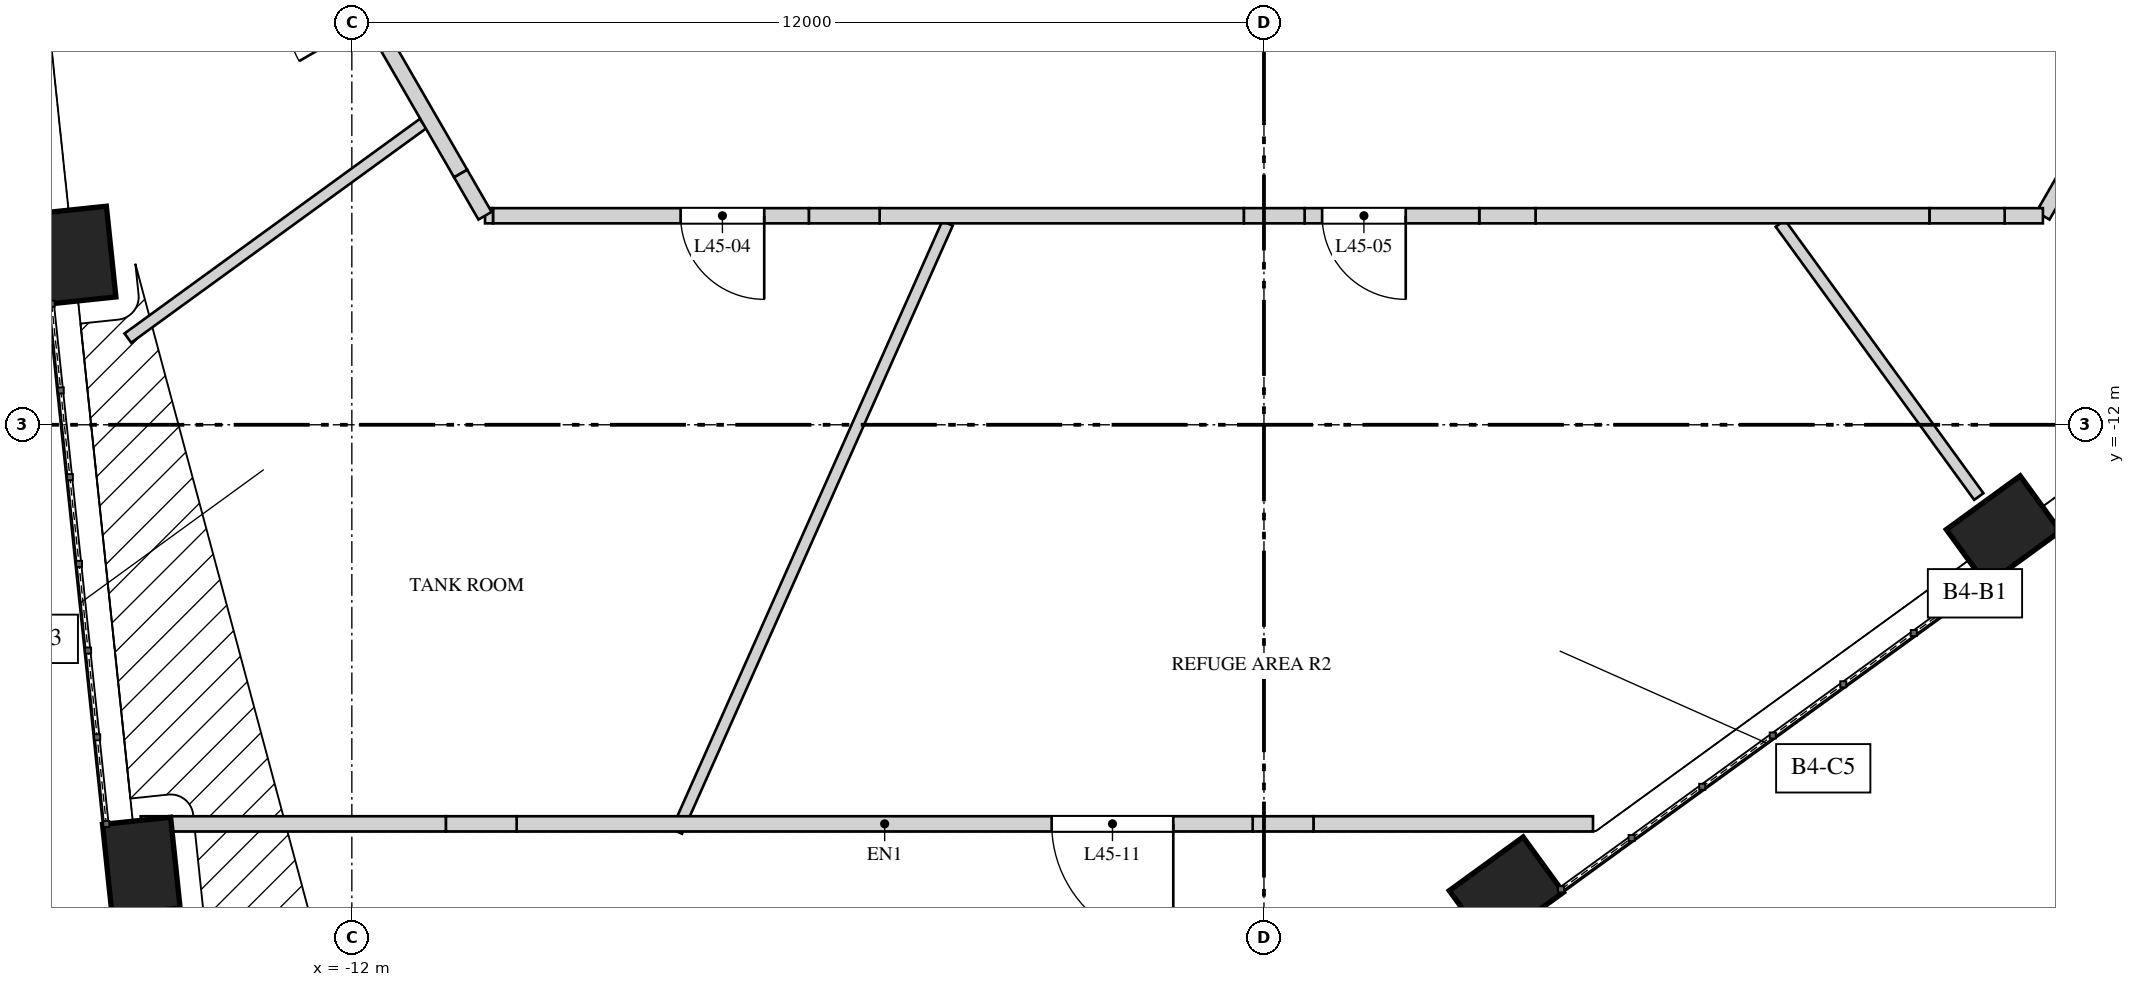
"""IFC4 building model, lengths in metres.
Left out: names, types, materials, properties, quantities, classifications, styles, units other than length and angle.
Written with IfcOpenShell. Run it as: python <this file> out.ifc"""

import sys

from ifc_helpers import new_model, si_unit, direction, frame, frame_2d, origin, origin_2d, place, context, subcontext, project, spatial, rectangle, extrude, element, fill, save


model = new_model("IFC4")
c1 = context("Model", 3, precision=1e-05, world=origin(), true_north=direction((0.0, 1.0)))
c2 = subcontext(c1, "Body", "Model", "MODEL_VIEW")
j1 = project(units=[si_unit("LENGTHUNIT", "METRE"), si_unit("PLANEANGLEUNIT", "RADIAN")], contexts=[c1])
p1 = place(None, origin())
s1 = spatial("IfcSite", under=j1, at=p1, CompositionType="ELEMENT")
p2 = place(p1, origin())
s2 = spatial("IfcBuilding", under=s1, at=p2, CompositionType="ELEMENT")
p3 = place(p2, frame((0.0, 0.0, 194.8)))
s3 = spatial("IfcBuildingStorey", under=s2, at=p3, CompositionType="ELEMENT", Elevation=194.8)
for number, where, z_axis, x_axis in (
    (1, (-15.615, -9.769, 0.0), (0.0, 0.0, 1.0), (0.105, -0.995, 0.0)),
    (2, (-14.77, -17.807, 0.0), (0.0, 0.0, 1.0), (0.105, -0.995, 0.0)),
    (3, (3.189, -18.14, 0.0), (0.0, 0.0, 1.0), (0.809, 0.588, 0.0)),
    (4, (9.728, -13.389, 0.0), (0.0, 0.0, 1.0), (0.809, 0.588, 0.0)),
):
    element("IfcColumn", number, at=place(p3, frame(where, z_axis=z_axis, x_axis=x_axis)), inside=s3, PredefinedType="COLUMN", context=c2, shape_type="SweptSolid", body=[
        extrude(rectangle(XDim=1.2, YDim=0.9, at=origin_2d()), origin(), (0.0, 0.0, 1.0), 2.835),
    ])
p4 = place(p3, frame((-11.063, -8.038, 0.0), z_axis=(0.0, 0.0, 1.0), x_axis=(-0.809019702923, -0.587781524278, 0.0)))
e5 = element("IfcWall", 5, at=p4, inside=s3, PredefinedType="PARTITIONING", context=c2, shape_type="SweptSolid", body=[
    extrude(rectangle(XDim=4.8, YDim=0.15, at=frame_2d((2.4, 0.0))), origin(), (0.0, 0.0, 1.0), 4.85),
])
p5 = place(p3, frame((-4.163, -9.35, 0.0), z_axis=(0.0, 0.0, 1.0), x_axis=(-0.406730743463, -0.913548084297, 0.0)))
e6 = element("IfcWall", 6, at=p5, inside=s3, PredefinedType="PARTITIONING", context=c2, shape_type="SweptSolid", body=[
    extrude(rectangle(XDim=8.757, YDim=0.15, at=frame_2d((4.378, 0.0))), origin(), (0.0, 0.0, 1.0), 4.85),
])
p6 = place(p3, frame((6.793, -9.35, 0.0), z_axis=(0.0, 0.0, 1.0), x_axis=(0.587779529971, -0.809021151854, 0.0)))
e7 = element("IfcWall", 7, at=p6, inside=s3, PredefinedType="PARTITIONING", context=c2, shape_type="SweptSolid", body=[
    extrude(rectangle(XDim=4.443, YDim=0.15, at=frame_2d((2.221, 0.0))), origin(), (0.0, 0.0, 1.0), 4.85),
])
p7 = place(p3, frame((12.813, -4.807, 0.0), z_axis=(0.0, 0.0, 1.0), x_axis=(-0.499992949462, -0.866029474376, 0.0)))
e8 = element("IfcWall", 8, at=p7, inside=s3, PredefinedType="SOLIDWALL", context=c2, shape_type="SweptSolid", body=[
    extrude(rectangle(XDim=5.13, YDim=0.2, at=frame_2d((2.565, 0.0))), origin(), (0.0, 0.0, 1.0), 4.85),
])
p8 = place(p7, frame((2.342, 0.0, 0.0)))
e9 = element("IfcOpeningElement", 9, at=p8, cuts=e8, PredefinedType="OPENING", context=c2, shape_type="SweptSolid", body=[
    extrude(rectangle(XDim=1.1, YDim=2.2, at=frame_2d((0.55, 1.1))), frame((0.0, 0.11, 0.0), z_axis=(0.0, -1.0, 0.0), x_axis=(1.0, 0.0, 0.0)), (0.0, 0.0, 1.0), 0.22),
])
p9 = place(p3, frame((10.248, -9.25, 0.0), z_axis=(0.0, 0.0, 1.0), x_axis=(-1.0, 0.0, 0.0)))
e10 = element("IfcWall", 10, at=p9, inside=s3, PredefinedType="SOLIDWALL", context=c2, shape_type="SweptSolid", body=[
    extrude(rectangle(XDim=0.503, YDim=0.2, at=frame_2d((0.251, 0.0))), origin(), (0.0, 0.0, 1.0), 4.85),
])
p10 = place(p3, frame((9.745, -9.25, 0.0), z_axis=(0.0, 0.0, 1.0), x_axis=(-1.0, 0.0, 0.0)))
e11 = element("IfcWall", 11, at=p10, inside=s3, PredefinedType="SOLIDWALL", context=c2, shape_type="SweptSolid", body=[
    extrude(rectangle(XDim=0.99, YDim=0.2, at=frame_2d((0.495, 0.0))), origin(), (0.0, 0.0, 1.0), 4.15),
])
p11 = place(p3, frame((8.755, -9.25, 0.0), z_axis=(0.0, 0.0, 1.0), x_axis=(-1.0, 0.0, 0.0)))
e12 = element("IfcWall", 12, at=p11, inside=s3, PredefinedType="SOLIDWALL", context=c2, shape_type="SweptSolid", body=[
    extrude(rectangle(XDim=5.182, YDim=0.2, at=frame_2d((2.591, 0.0))), origin(), (0.0, 0.0, 1.0), 4.85),
])
p12 = place(p3, frame((3.573, -9.25, 0.0), z_axis=(0.0, 0.0, 1.0), x_axis=(-1.0, 0.0, 0.0)))
e13 = element("IfcWall", 13, at=p12, inside=s3, PredefinedType="SOLIDWALL", context=c2, shape_type="SweptSolid", body=[
    extrude(rectangle(XDim=0.741, YDim=0.2, at=frame_2d((0.37, 0.0))), origin(), (0.0, 0.0, 1.0), 4.15),
])
p13 = place(p3, frame((2.832, -9.25, 0.0), z_axis=(0.0, 0.0, 1.0), x_axis=(-1.0, 0.0, 0.0)))
e14 = element("IfcWall", 14, at=p13, inside=s3, PredefinedType="SOLIDWALL", context=c2, shape_type="SweptSolid", body=[
    extrude(rectangle(XDim=2.297, YDim=0.2, at=frame_2d((1.149, 0.0))), origin(), (0.0, 0.0, 1.0), 4.85),
])
p14 = place(p13, frame((0.967, 0.0, 0.0)))
e15 = element("IfcOpeningElement", 15, at=p14, cuts=e14, PredefinedType="OPENING", context=c2, shape_type="SweptSolid", body=[
    extrude(rectangle(XDim=1.1, YDim=2.2, at=frame_2d((0.55, 1.1))), frame((0.0, 0.11, 0.0), z_axis=(0.0, -1.0, 0.0), x_axis=(1.0, 0.0, 0.0)), (0.0, 0.0, 1.0), 0.22),
])
p15 = place(p3, frame((0.535, -9.25, 0.0), z_axis=(0.0, 0.0, 1.0), x_axis=(-1.0, 0.0, 0.0)))
e16 = element("IfcWall", 16, at=p15, inside=s3, PredefinedType="SOLIDWALL", context=c2, shape_type="SweptSolid", body=[
    extrude(rectangle(XDim=0.8, YDim=0.2, at=frame_2d((0.4, 0.0))), origin(), (0.0, 0.0, 1.0), 3.95),
])
p16 = place(p3, frame((-0.265, -9.25, 0.0), z_axis=(0.0, 0.0, 1.0), x_axis=(-1.0, 0.0, 0.0)))
e17 = element("IfcWall", 17, at=p16, inside=s3, PredefinedType="SOLIDWALL", context=c2, shape_type="SweptSolid", body=[
    extrude(rectangle(XDim=4.791, YDim=0.2, at=frame_2d((2.396, 0.0))), origin(), (0.0, 0.0, 1.0), 4.85),
])
p17 = place(p3, frame((-5.056, -9.25, 0.0), z_axis=(0.0, 0.0, 1.0), x_axis=(-1.0, 0.0, 0.0)))
e18 = element("IfcWall", 18, at=p17, inside=s3, PredefinedType="SOLIDWALL", context=c2, shape_type="SweptSolid", body=[
    extrude(rectangle(XDim=0.932, YDim=0.2, at=frame_2d((0.466, 0.0))), origin(), (0.0, 0.0, 1.0), 3.95),
])
p18 = place(p3, frame((-5.988, -9.25, 0.0), z_axis=(0.0, 0.0, 1.0), x_axis=(-1.0, 0.0, 0.0)))
e19 = element("IfcWall", 19, at=p18, inside=s3, PredefinedType="SOLIDWALL", context=c2, shape_type="SweptSolid", body=[
    extrude(rectangle(XDim=4.155, YDim=0.2, at=frame_2d((2.078, 0.0))), origin(), (0.0, 0.0, 1.0), 4.85),
])
p19 = place(p18, frame((0.587, 0.0, 0.0)))
e20 = element("IfcOpeningElement", 20, at=p19, cuts=e19, PredefinedType="OPENING", context=c2, shape_type="SweptSolid", body=[
    extrude(rectangle(XDim=1.1, YDim=2.2, at=frame_2d((0.55, 1.1))), frame((0.0, 0.11, 0.0), z_axis=(0.0, -1.0, 0.0), x_axis=(1.0, 0.0, 0.0)), (0.0, 0.0, 1.0), 0.22),
])
p20 = place(p3, frame((-10.143, -9.25, 0.0), z_axis=(0.0, 0.0, 1.0), x_axis=(-1.0, 0.0, 0.0)))
e21 = element("IfcWall", 21, at=p20, inside=s3, PredefinedType="SOLIDWALL", context=c2, shape_type="SweptSolid", body=[
    extrude(rectangle(XDim=0.105, YDim=0.2, at=frame_2d((0.052, 0.0))), origin(), (0.0, 0.0, 1.0), 4.15),
])
p21 = place(p3, frame((-10.248, -9.25, 0.0), z_axis=(0.0, 0.0, 1.0), x_axis=(-0.499733411443, 0.86617926406, 0.0)))
e22 = element("IfcWall", 22, at=p21, inside=s3, PredefinedType="SOLIDWALL", context=c2, shape_type="SweptSolid", body=[
    extrude(rectangle(XDim=0.643, YDim=0.2, at=frame_2d((0.321, 0.0))), origin(), (0.0, 0.0, 1.0), 4.15),
])
p22 = place(p3, frame((-10.569, -8.693, 0.0), z_axis=(0.0, 0.0, 1.0), x_axis=(-0.500028638513, 0.8660088687, 0.0)))
e23 = element("IfcWall", 23, at=p22, inside=s3, PredefinedType="SOLIDWALL", context=c2, shape_type="SweptSolid", body=[
    extrude(rectangle(XDim=5.131, YDim=0.2, at=frame_2d((2.565, 0.0))), origin(), (0.0, 0.0, 1.0), 4.85),
])
p23 = place(p22, frame((2.342, 0.0, 0.0)))
e24 = element("IfcOpeningElement", 24, at=p23, cuts=e23, PredefinedType="OPENING", context=c2, shape_type="SweptSolid", body=[
    extrude(rectangle(XDim=1.1, YDim=2.2, at=frame_2d((0.55, 1.1))), frame((0.0, 0.11, 0.0), z_axis=(0.0, -1.0, 0.0), x_axis=(1.0, 0.0, 0.0)), (0.0, 0.0, 1.0), 0.22),
])
p24 = place(p3, frame((4.329, -17.25, 0.0), z_axis=(0.0, 0.0, 1.0), x_axis=(-1.0, 0.0, 0.0)))
e25 = element("IfcWall", 25, at=p24, inside=s3, PredefinedType="SOLIDWALL", context=c2, shape_type="SweptSolid", body=[
    extrude(rectangle(XDim=3.677, YDim=0.2, at=frame_2d((1.839, 0.0))), origin(), (0.0, 0.0, 1.0), 4.85),
])
p25 = place(p3, frame((0.652, -17.25, 0.0), z_axis=(0.0, 0.0, 1.0), x_axis=(-1.0, 0.0, 0.0)))
e26 = element("IfcWall", 26, at=p25, inside=s3, PredefinedType="SOLIDWALL", context=c2, shape_type="SweptSolid", body=[
    extrude(rectangle(XDim=0.8, YDim=0.2, at=frame_2d((0.4, 0.0))), origin(), (0.0, 0.0, 1.0), 3.95),
])
p26 = place(p3, frame((-0.148, -17.25, 0.0), z_axis=(0.0, 0.0, 1.0), x_axis=(-1.0, 0.0, 0.0)))
e27 = element("IfcWall", 27, at=p26, inside=s3, PredefinedType="SOLIDWALL", context=c2, shape_type="SweptSolid", body=[
    extrude(rectangle(XDim=9.683, YDim=0.2, at=frame_2d((4.842, 0.0))), origin(), (0.0, 0.0, 1.0), 4.85),
])
p27 = place(p26, frame((1.045, 0.0, 0.0)))
e28 = element("IfcOpeningElement", 28, at=p27, cuts=e27, PredefinedType="OPENING", context=c2, shape_type="SweptSolid", body=[
    extrude(rectangle(XDim=1.6, YDim=2.3, at=frame_2d((0.8, 1.15))), frame((0.0, 0.11, 0.0), z_axis=(0.0, -1.0, 0.0), x_axis=(1.0, 0.0, 0.0)), (0.0, 0.0, 1.0), 0.22),
])
p28 = place(p3, frame((-9.832, -17.25, 0.0), z_axis=(0.0, 0.0, 1.0), x_axis=(-1.0, 0.0, 0.0)))
e29 = element("IfcWall", 29, at=p28, inside=s3, PredefinedType="SOLIDWALL", context=c2, shape_type="SweptSolid", body=[
    extrude(rectangle(XDim=0.932, YDim=0.2, at=frame_2d((0.466, 0.0))), origin(), (0.0, 0.0, 1.0), 3.95),
])
p29 = place(p3, frame((-10.763, -17.25, 0.0), z_axis=(0.0, 0.0, 1.0), x_axis=(-1.0, 0.0, 0.0)))
e30 = element("IfcWall", 30, at=p29, inside=s3, PredefinedType="SOLIDWALL", context=c2, shape_type="SweptSolid", body=[
    extrude(rectangle(XDim=4.014, YDim=0.2, at=frame_2d((2.007, 0.0))), origin(), (0.0, 0.0, 1.0), 4.85),
])
p30 = place(p19, origin())
e31 = element("IfcDoor", 31, at=p30, inside=s3, OperationType="SINGLE_SWING_RIGHT", PredefinedType="DOOR", context=c2, shape_type="SweptSolid", body=[
    extrude(rectangle(XDim=1.1, YDim=2.2, at=frame_2d((0.55, 1.1))), frame((0.0, 0.025, 0.0), z_axis=(0.0, -1.0, 0.0), x_axis=(1.0, 0.0, 0.0)), (0.0, 0.0, 1.0), 0.05),
])
fill(e20, e31)
p31 = place(p14, origin())
e32 = element("IfcDoor", 32, at=p31, inside=s3, OperationType="SINGLE_SWING_LEFT", PredefinedType="DOOR", context=c2, shape_type="SweptSolid", body=[
    extrude(rectangle(XDim=1.1, YDim=2.2, at=frame_2d((0.55, 1.1))), frame((0.0, 0.025, 0.0), z_axis=(0.0, -1.0, 0.0), x_axis=(1.0, 0.0, 0.0)), (0.0, 0.0, 1.0), 0.05),
])
fill(e15, e32)
p32 = place(p27, origin())
e33 = element("IfcDoor", 33, at=p32, inside=s3, OperationType="DOUBLE_DOOR_SINGLE_SWING", PredefinedType="DOOR", context=c2, shape_type="SweptSolid", body=[
    extrude(rectangle(XDim=1.6, YDim=2.3, at=frame_2d((0.8, 1.15))), frame((0.0, 0.025, 0.0), z_axis=(0.0, -1.0, 0.0), x_axis=(1.0, 0.0, 0.0)), (0.0, 0.0, 1.0), 0.05),
])
fill(e28, e33)
save(model, sys.argv[1])
